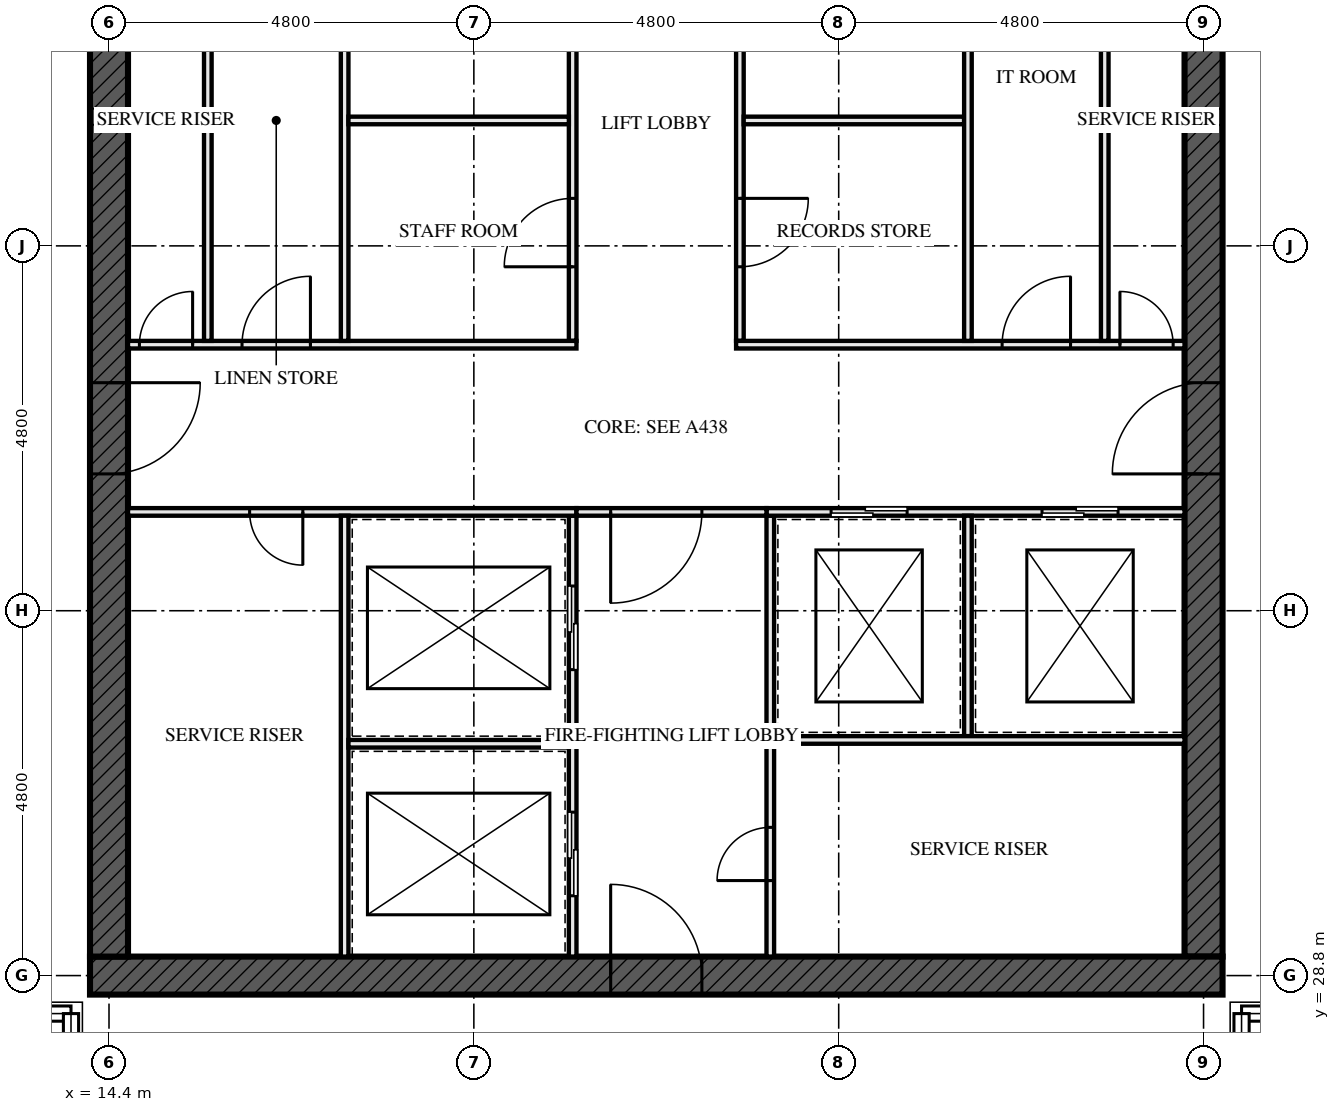
"""IFC4 building model, lengths in metres.
Left out: names, types, materials, properties, quantities, classifications, styles, units other than length and angle.
Written with IfcOpenShell. Run it as: python <this file> out.ifc"""

import sys

from ifc_helpers import new_model, si_unit, direction, frame, frame_2d, origin, place, context, subcontext, project, spatial, rectangle, extrude, element, fill, save


model = new_model("IFC4")
c1 = context("Model", 3, precision=1e-05, world=origin(), true_north=direction((0.0, 1.0)))
c2 = subcontext(c1, "Body", "Model", "MODEL_VIEW")
j1 = project(units=[si_unit("LENGTHUNIT", "METRE"), si_unit("PLANEANGLEUNIT", "RADIAN")], contexts=[c1])
p1 = place(None, origin())
s1 = spatial("IfcSite", under=j1, at=p1, CompositionType="ELEMENT")
p2 = place(p1, origin())
s2 = spatial("IfcBuilding", under=s1, at=p2, CompositionType="ELEMENT")
p3 = place(p2, frame((0.0, 0.0, 190.0)))
s3 = spatial("IfcBuildingStorey", under=s2, at=p3, CompositionType="ELEMENT", Elevation=190.0)
p4 = place(p3, frame((14.15, 28.8, -0.25), z_axis=(0.0, 0.0, 1.0), x_axis=(1.0, 0.0, 0.0)))
e1 = element("IfcWall", 1, at=p4, inside=s3, PredefinedType="SHEAR", context=c2, shape_type="SweptSolid", body=[
    extrude(rectangle(XDim=14.9, YDim=0.5, at=frame_2d((7.45, 0.0))), origin(), (0.0, 0.0, 1.0), 4.58),
])
p5 = place(p4, frame((6.85, 0.0, 0.25)))
e2 = element("IfcOpeningElement", 2, at=p5, cuts=e1, PredefinedType="OPENING", context=c2, shape_type="SweptSolid", body=[
    extrude(rectangle(XDim=1.2, YDim=2.1, at=frame_2d((0.6, 1.05))), frame((0.0, 0.26, 0.0), z_axis=(0.0, -1.0, 0.0), x_axis=(1.0, 0.0, 0.0)), (0.0, 0.0, 1.0), 0.521),
])
p6 = place(p3, frame((14.4, 42.95, -0.25), z_axis=(0.0, 0.0, 1.0), x_axis=(0.0, -1.0, 0.0)))
e3 = element("IfcWall", 3, at=p6, inside=s3, PredefinedType="SHEAR", context=c2, shape_type="SweptSolid", body=[
    extrude(rectangle(XDim=13.9, YDim=0.5, at=frame_2d((6.95, 0.0))), origin(), (0.0, 0.0, 1.0), 4.58),
])
p7 = place(p6, frame((6.35, 0.0, 0.25)))
e4 = element("IfcOpeningElement", 4, at=p7, cuts=e3, PredefinedType="OPENING", context=c2, shape_type="SweptSolid", body=[
    extrude(rectangle(XDim=1.2, YDim=2.1, at=frame_2d((0.6, 1.05))), frame((0.0, 0.26, 0.0), z_axis=(0.0, -1.0, 0.0), x_axis=(1.0, 0.0, 0.0)), (0.0, 0.0, 1.0), 0.521),
])
p8 = place(p3, frame((28.8, 29.05, -0.25), z_axis=(0.0, 0.0, 1.0), x_axis=(0.0, 1.0, 0.0)))
e5 = element("IfcWall", 5, at=p8, inside=s3, PredefinedType="SHEAR", context=c2, shape_type="SweptSolid", body=[
    extrude(rectangle(XDim=13.9, YDim=0.5, at=frame_2d((6.95, 0.0))), origin(), (0.0, 0.0, 1.0), 4.58),
])
p9 = place(p8, frame((6.35, 0.0, 0.25)))
e6 = element("IfcOpeningElement", 6, at=p9, cuts=e5, PredefinedType="OPENING", context=c2, shape_type="SweptSolid", body=[
    extrude(rectangle(XDim=1.2, YDim=2.1, at=frame_2d((0.6, 1.05))), frame((0.0, 0.26, 0.0), z_axis=(0.0, -1.0, 0.0), x_axis=(1.0, 0.0, 0.0)), (0.0, 0.0, 1.0), 0.521),
])
for number, where, z_axis, x_axis in (
    (7, (15.7, 37.15, 0.0), (0.0, 0.0, 1.0), (0.0, 1.0, 0.0)),
    (8, (27.5, 37.15, 0.0), (0.0, 0.0, 1.0), (0.0, 1.0, 0.0)),
):
    element("IfcWall", number, at=place(p3, frame(where, z_axis=z_axis, x_axis=x_axis)), inside=s3, PredefinedType="SOLIDWALL", context=c2, shape_type="SweptSolid", body=[
        extrude(rectangle(XDim=5.8, YDim=0.1, at=frame_2d((2.9, 0.0))), origin(), (0.0, 0.0, 1.0), 4.33),
    ])
p10 = place(p3, frame((20.5, 29.05, 0.0), z_axis=(0.0, 0.0, 1.0), x_axis=(0.0, 1.0, 0.0)))
e9 = element("IfcWall", 9, at=p10, inside=s3, PredefinedType="SOLIDWALL", context=c2, shape_type="SweptSolid", body=[
    extrude(rectangle(XDim=5.8, YDim=0.1, at=frame_2d((2.9, 0.0))), origin(), (0.0, 0.0, 1.0), 4.33),
])
p11 = place(p10, frame((0.8, 0.0, 0.0)))
e10 = element("IfcOpeningElement", 10, at=p11, cuts=e9, PredefinedType="OPENING", context=c2, shape_type="SweptSolid", body=[
    extrude(rectangle(XDim=1.1, YDim=2.3, at=frame_2d((0.55, 1.15))), frame((0.0, 0.061, 0.0), z_axis=(0.0, -1.0, 0.0), x_axis=(1.0, 0.0, 0.0)), (0.0, 0.0, 1.0), 0.121),
])
p12 = place(p10, frame((3.775, 0.0, 0.0)))
e11 = element("IfcOpeningElement", 11, at=p12, cuts=e9, PredefinedType="OPENING", context=c2, shape_type="SweptSolid", body=[
    extrude(rectangle(XDim=1.1, YDim=2.3, at=frame_2d((0.55, 1.15))), frame((0.0, 0.061, 0.0), z_axis=(0.0, -1.0, 0.0), x_axis=(1.0, 0.0, 0.0)), (0.0, 0.0, 1.0), 0.121),
])
p13 = place(p3, frame((20.5, 37.15, 0.0), z_axis=(0.0, 0.0, 1.0), x_axis=(0.0, 1.0, 0.0)))
e12 = element("IfcWall", 12, at=p13, inside=s3, PredefinedType="SOLIDWALL", context=c2, shape_type="SweptSolid", body=[
    extrude(rectangle(XDim=5.8, YDim=0.1, at=frame_2d((2.9, 0.0))), origin(), (0.0, 0.0, 1.0), 4.33),
])
p14 = place(p13, frame((0.975, 0.0, 0.0)))
e13 = element("IfcOpeningElement", 13, at=p14, cuts=e12, PredefinedType="OPENING", context=c2, shape_type="SweptSolid", body=[
    extrude(rectangle(XDim=0.9, YDim=2.1, at=frame_2d((0.45, 1.05))), frame((0.0, 0.061, 0.0), z_axis=(0.0, -1.0, 0.0), x_axis=(1.0, 0.0, 0.0)), (0.0, 0.0, 1.0), 0.121),
])
p15 = place(p13, frame((3.95, 0.0, 0.0)))
e14 = element("IfcOpeningElement", 14, at=p15, cuts=e12, PredefinedType="OPENING", context=c2, shape_type="SweptSolid", body=[
    extrude(rectangle(XDim=0.9, YDim=2.1, at=frame_2d((0.45, 1.05))), frame((0.0, 0.061, 0.0), z_axis=(0.0, -1.0, 0.0), x_axis=(1.0, 0.0, 0.0)), (0.0, 0.0, 1.0), 0.121),
])
p16 = place(p3, frame((22.7, 37.15, 0.0), z_axis=(0.0, 0.0, 1.0), x_axis=(0.0, 1.0, 0.0)))
e15 = element("IfcWall", 15, at=p16, inside=s3, PredefinedType="SOLIDWALL", context=c2, shape_type="SweptSolid", body=[
    extrude(rectangle(XDim=5.8, YDim=0.1, at=frame_2d((2.9, 0.0))), origin(), (0.0, 0.0, 1.0), 4.33),
])
p17 = place(p16, frame((0.975, 0.0, 0.0)))
e16 = element("IfcOpeningElement", 16, at=p17, cuts=e15, PredefinedType="OPENING", context=c2, shape_type="SweptSolid", body=[
    extrude(rectangle(XDim=0.9, YDim=2.1, at=frame_2d((0.45, 1.05))), frame((0.0, 0.061, 0.0), z_axis=(0.0, -1.0, 0.0), x_axis=(1.0, 0.0, 0.0)), (0.0, 0.0, 1.0), 0.121),
])
p18 = place(p16, frame((3.95, 0.0, 0.0)))
e17 = element("IfcOpeningElement", 17, at=p18, cuts=e15, PredefinedType="OPENING", context=c2, shape_type="SweptSolid", body=[
    extrude(rectangle(XDim=0.9, YDim=2.1, at=frame_2d((0.45, 1.05))), frame((0.0, 0.061, 0.0), z_axis=(0.0, -1.0, 0.0), x_axis=(1.0, 0.0, 0.0)), (0.0, 0.0, 1.0), 0.121),
])
p19 = place(p3, frame((23.1, 29.05, 0.0), z_axis=(0.0, 0.0, 1.0), x_axis=(0.0, 1.0, 0.0)))
e18 = element("IfcWall", 18, at=p19, inside=s3, PredefinedType="SOLIDWALL", context=c2, shape_type="SweptSolid", body=[
    extrude(rectangle(XDim=5.8, YDim=0.1, at=frame_2d((2.9, 0.0))), origin(), (0.0, 0.0, 1.0), 4.33),
])
p20 = place(p19, frame((1.0, 0.0, 0.0)))
e19 = element("IfcOpeningElement", 19, at=p20, cuts=e18, PredefinedType="OPENING", context=c2, shape_type="SweptSolid", body=[
    extrude(rectangle(XDim=0.7, YDim=2.1, at=frame_2d((0.35, 1.05))), frame((0.0, 0.061, 0.0), z_axis=(0.0, -1.0, 0.0), x_axis=(1.0, 0.0, 0.0)), (0.0, 0.0, 1.0), 0.121),
])
p21 = place(p3, frame((14.65, 34.9, 0.0), z_axis=(0.0, 0.0, 1.0), x_axis=(1.0, 0.0, 0.0)))
e20 = element("IfcWall", 20, at=p21, inside=s3, PredefinedType="SOLIDWALL", context=c2, shape_type="SweptSolid", body=[
    extrude(rectangle(XDim=5.9, YDim=0.1, at=frame_2d((2.95, 0.0))), origin(), (0.0, 0.0, 1.0), 4.33),
])
p22 = place(p21, frame((1.6, 0.0, 0.0)))
e21 = element("IfcOpeningElement", 21, at=p22, cuts=e20, PredefinedType="OPENING", context=c2, shape_type="SweptSolid", body=[
    extrude(rectangle(XDim=0.7, YDim=2.1, at=frame_2d((0.35, 1.05))), frame((0.0, 0.061, 0.0), z_axis=(0.0, -1.0, 0.0), x_axis=(1.0, 0.0, 0.0)), (0.0, 0.0, 1.0), 0.121),
])
p23 = place(p3, frame((23.05, 34.9, 0.0), z_axis=(0.0, 0.0, 1.0), x_axis=(1.0, 0.0, 0.0)))
e22 = element("IfcWall", 22, at=p23, inside=s3, PredefinedType="SOLIDWALL", context=c2, shape_type="SweptSolid", body=[
    extrude(rectangle(XDim=5.5, YDim=0.1, at=frame_2d((2.75, 0.0))), origin(), (0.0, 0.0, 1.0), 4.33),
])
p24 = place(p23, frame((0.85, 0.0, 0.0)))
e23 = element("IfcOpeningElement", 23, at=p24, cuts=e22, PredefinedType="OPENING", context=c2, shape_type="SweptSolid", body=[
    extrude(rectangle(XDim=1.0, YDim=2.1, at=frame_2d((0.5, 1.05))), frame((0.0, 0.061, 0.0), z_axis=(0.0, -1.0, 0.0), x_axis=(1.0, 0.0, 0.0)), (0.0, 0.0, 1.0), 0.121),
])
p25 = place(p23, frame((3.625, 0.0, 0.0)))
e24 = element("IfcOpeningElement", 24, at=p25, cuts=e22, PredefinedType="OPENING", context=c2, shape_type="SweptSolid", body=[
    extrude(rectangle(XDim=1.0, YDim=2.1, at=frame_2d((0.5, 1.05))), frame((0.0, 0.061, 0.0), z_axis=(0.0, -1.0, 0.0), x_axis=(1.0, 0.0, 0.0)), (0.0, 0.0, 1.0), 0.121),
])
p26 = place(p3, frame((14.65, 37.1, 0.0), z_axis=(0.0, 0.0, 1.0), x_axis=(1.0, 0.0, 0.0)))
e25 = element("IfcWall", 25, at=p26, inside=s3, PredefinedType="SOLIDWALL", context=c2, shape_type="SweptSolid", body=[
    extrude(rectangle(XDim=5.9, YDim=0.1, at=frame_2d((2.95, 0.0))), origin(), (0.0, 0.0, 1.0), 4.33),
])
p27 = place(p26, frame((0.15, 0.0, 0.0)))
e26 = element("IfcOpeningElement", 26, at=p27, cuts=e25, PredefinedType="OPENING", context=c2, shape_type="SweptSolid", body=[
    extrude(rectangle(XDim=0.7, YDim=2.1, at=frame_2d((0.35, 1.05))), frame((0.0, 0.061, 0.0), z_axis=(0.0, -1.0, 0.0), x_axis=(1.0, 0.0, 0.0)), (0.0, 0.0, 1.0), 0.121),
])
p28 = place(p26, frame((1.5, 0.0, 0.0)))
e27 = element("IfcOpeningElement", 27, at=p28, cuts=e25, PredefinedType="OPENING", context=c2, shape_type="SweptSolid", body=[
    extrude(rectangle(XDim=0.9, YDim=2.1, at=frame_2d((0.45, 1.05))), frame((0.0, 0.061, 0.0), z_axis=(0.0, -1.0, 0.0), x_axis=(1.0, 0.0, 0.0)), (0.0, 0.0, 1.0), 0.121),
])
p29 = place(p3, frame((22.65, 37.1, 0.0), z_axis=(0.0, 0.0, 1.0), x_axis=(1.0, 0.0, 0.0)))
e28 = element("IfcWall", 28, at=p29, inside=s3, PredefinedType="SOLIDWALL", context=c2, shape_type="SweptSolid", body=[
    extrude(rectangle(XDim=5.9, YDim=0.1, at=frame_2d((2.95, 0.0))), origin(), (0.0, 0.0, 1.0), 4.33),
])
p30 = place(p29, frame((3.5, 0.0, 0.0)))
e29 = element("IfcOpeningElement", 29, at=p30, cuts=e28, PredefinedType="OPENING", context=c2, shape_type="SweptSolid", body=[
    extrude(rectangle(XDim=0.9, YDim=2.1, at=frame_2d((0.45, 1.05))), frame((0.0, 0.061, 0.0), z_axis=(0.0, -1.0, 0.0), x_axis=(1.0, 0.0, 0.0)), (0.0, 0.0, 1.0), 0.121),
])
p31 = place(p29, frame((5.05, 0.0, 0.0)))
e30 = element("IfcOpeningElement", 30, at=p31, cuts=e28, PredefinedType="OPENING", context=c2, shape_type="SweptSolid", body=[
    extrude(rectangle(XDim=0.7, YDim=2.1, at=frame_2d((0.35, 1.05))), frame((0.0, 0.061, 0.0), z_axis=(0.0, -1.0, 0.0), x_axis=(1.0, 0.0, 0.0)), (0.0, 0.0, 1.0), 0.121),
])
p32 = place(p3, frame((20.55, 34.9, 0.0), z_axis=(0.0, 0.0, 1.0), x_axis=(1.0, 0.0, 0.0)))
e31 = element("IfcWall", 31, at=p32, inside=s3, PredefinedType="SOLIDWALL", context=c2, shape_type="SweptSolid", body=[
    extrude(rectangle(XDim=2.5, YDim=0.1, at=frame_2d((1.25, 0.0))), origin(), (0.0, 0.0, 1.0), 4.33),
])
p33 = place(p32, frame((0.45, 0.0, 0.0)))
e32 = element("IfcOpeningElement", 32, at=p33, cuts=e31, PredefinedType="OPENING", context=c2, shape_type="SweptSolid", body=[
    extrude(rectangle(XDim=1.2, YDim=2.1, at=frame_2d((0.6, 1.05))), frame((0.0, 0.061, 0.0), z_axis=(0.0, -1.0, 0.0), x_axis=(1.0, 0.0, 0.0)), (0.0, 0.0, 1.0), 0.121),
])
p34 = place(p3, frame((17.5, 29.05, 0.0), z_axis=(0.0, 0.0, 1.0), x_axis=(0.0, 1.0, 0.0)))
e33 = element("IfcWall", 33, at=p34, inside=s3, PredefinedType="SOLIDWALL", context=c2, shape_type="SweptSolid", body=[
    extrude(rectangle(XDim=5.8, YDim=0.1, at=frame_2d((2.9, 0.0))), origin(), (0.0, 0.0, 1.0), 4.33),
])
p35 = place(p3, frame((17.55, 31.85, 0.0), z_axis=(0.0, 0.0, 1.0), x_axis=(1.0, 0.0, 0.0)))
e34 = element("IfcWall", 34, at=p35, inside=s3, PredefinedType="SOLIDWALL", context=c2, shape_type="SweptSolid", body=[
    extrude(rectangle(XDim=2.9, YDim=0.1, at=frame_2d((1.45, 0.0))), origin(), (0.0, 0.0, 1.0), 4.33),
])
p36 = place(p3, frame((17.5, 37.15, 0.0), z_axis=(0.0, 0.0, 1.0), x_axis=(0.0, 1.0, 0.0)))
e35 = element("IfcWall", 35, at=p36, inside=s3, PredefinedType="SOLIDWALL", context=c2, shape_type="SweptSolid", body=[
    extrude(rectangle(XDim=5.8, YDim=0.1, at=frame_2d((2.9, 0.0))), origin(), (0.0, 0.0, 1.0), 4.33),
])
for number, where, z_axis, x_axis in (
    (36, (17.55, 40.05, 0.0), (0.0, 0.0, 1.0), (1.0, 0.0, 0.0)),
    (37, (22.75, 40.05, 0.0), (0.0, 0.0, 1.0), (1.0, 0.0, 0.0)),
):
    element("IfcWall", number, at=place(p3, frame(where, z_axis=z_axis, x_axis=x_axis)), inside=s3, PredefinedType="SOLIDWALL", context=c2, shape_type="SweptSolid", body=[
        extrude(rectangle(XDim=2.9, YDim=0.1, at=frame_2d((1.45, 0.0))), origin(), (0.0, 0.0, 1.0), 4.33),
    ])
p37 = place(p3, frame((25.7, 37.15, 0.0), z_axis=(0.0, 0.0, 1.0), x_axis=(0.0, 1.0, 0.0)))
e38 = element("IfcWall", 38, at=p37, inside=s3, PredefinedType="SOLIDWALL", context=c2, shape_type="SweptSolid", body=[
    extrude(rectangle(XDim=5.8, YDim=0.1, at=frame_2d((2.9, 0.0))), origin(), (0.0, 0.0, 1.0), 4.33),
])
p38 = place(p3, frame((25.7, 31.95, 0.0), z_axis=(0.0, 0.0, 1.0), x_axis=(0.0, 1.0, 0.0)))
e39 = element("IfcWall", 39, at=p38, inside=s3, PredefinedType="SOLIDWALL", context=c2, shape_type="SweptSolid", body=[
    extrude(rectangle(XDim=2.9, YDim=0.1, at=frame_2d((1.45, 0.0))), origin(), (0.0, 0.0, 1.0), 4.33),
])
p39 = place(p3, frame((23.15, 31.9, 0.0), z_axis=(0.0, 0.0, 1.0), x_axis=(1.0, 0.0, 0.0)))
e40 = element("IfcWall", 40, at=p39, inside=s3, PredefinedType="SOLIDWALL", context=c2, shape_type="SweptSolid", body=[
    extrude(rectangle(XDim=5.4, YDim=0.1, at=frame_2d((2.7, 0.0))), origin(), (0.0, 0.0, 1.0), 4.33),
])
p40 = place(p11, origin())
e41 = element("IfcDoor", 41, at=p40, inside=s3, OperationType="SLIDING_TO_LEFT", PredefinedType="DOOR", context=c2, shape_type="SweptSolid", body=[
    extrude(rectangle(XDim=1.1, YDim=2.3, at=frame_2d((0.55, 1.15))), frame((0.0, 0.05, 0.0), z_axis=(0.0, -1.0, 0.0), x_axis=(1.0, 0.0, 0.0)), (0.0, 0.0, 1.0), 0.1),
])
fill(e10, e41)
p41 = place(p12, origin())
e42 = element("IfcDoor", 42, at=p41, inside=s3, OperationType="SLIDING_TO_LEFT", PredefinedType="DOOR", context=c2, shape_type="SweptSolid", body=[
    extrude(rectangle(XDim=1.1, YDim=2.3, at=frame_2d((0.55, 1.15))), frame((0.0, 0.05, 0.0), z_axis=(0.0, -1.0, 0.0), x_axis=(1.0, 0.0, 0.0)), (0.0, 0.0, 1.0), 0.1),
])
fill(e11, e42)
p42 = place(p14, origin())
e43 = element("IfcDoor", 43, at=p42, inside=s3, OperationType="SINGLE_SWING_RIGHT", PredefinedType="DOOR", context=c2, shape_type="SweptSolid", body=[
    extrude(rectangle(XDim=0.9, YDim=2.1, at=frame_2d((0.45, 1.05))), frame((0.0, 0.027, 0.0), z_axis=(0.0, -1.0, 0.0), x_axis=(1.0, 0.0, 0.0)), (0.0, 0.0, 1.0), 0.054),
])
fill(e13, e43)
p43 = place(p17, frame((0.9, 0.0, 0.0), z_axis=(0.0, 0.0, 1.0), x_axis=(-1.0, 0.0, 0.0)))
e44 = element("IfcDoor", 44, at=p43, inside=s3, OperationType="SINGLE_SWING_RIGHT", PredefinedType="DOOR", context=c2, shape_type="SweptSolid", body=[
    extrude(rectangle(XDim=0.9, YDim=2.1, at=frame_2d((0.45, 1.05))), frame((0.0, 0.027, 0.0), z_axis=(0.0, -1.0, 0.0), x_axis=(1.0, 0.0, 0.0)), (0.0, 0.0, 1.0), 0.054),
])
fill(e16, e44)
p44 = place(p20, origin())
e45 = element("IfcDoor", 45, at=p44, inside=s3, OperationType="SINGLE_SWING_RIGHT", PredefinedType="DOOR", context=c2, shape_type="SweptSolid", body=[
    extrude(rectangle(XDim=0.7, YDim=2.1, at=frame_2d((0.35, 1.05))), frame((0.0, 0.027, 0.0), z_axis=(0.0, -1.0, 0.0), x_axis=(1.0, 0.0, 0.0)), (0.0, 0.0, 1.0), 0.054),
])
fill(e19, e45)
p45 = place(p22, frame((0.7, 0.0, 0.0), z_axis=(0.0, 0.0, 1.0), x_axis=(-1.0, 0.0, 0.0)))
e46 = element("IfcDoor", 46, at=p45, inside=s3, OperationType="SINGLE_SWING_RIGHT", PredefinedType="DOOR", context=c2, shape_type="SweptSolid", body=[
    extrude(rectangle(XDim=0.7, YDim=2.1, at=frame_2d((0.35, 1.05))), frame((0.0, 0.027, 0.0), z_axis=(0.0, -1.0, 0.0), x_axis=(1.0, 0.0, 0.0)), (0.0, 0.0, 1.0), 0.054),
])
fill(e21, e46)
p46 = place(p24, origin())
e47 = element("IfcDoor", 47, at=p46, inside=s3, OperationType="SLIDING_TO_LEFT", PredefinedType="DOOR", context=c2, shape_type="SweptSolid", body=[
    extrude(rectangle(XDim=1.0, YDim=2.1, at=frame_2d((0.5, 1.05))), frame((0.0, 0.05, 0.0), z_axis=(0.0, -1.0, 0.0), x_axis=(1.0, 0.0, 0.0)), (0.0, 0.0, 1.0), 0.1),
])
fill(e23, e47)
p47 = place(p25, origin())
e48 = element("IfcDoor", 48, at=p47, inside=s3, OperationType="SLIDING_TO_LEFT", PredefinedType="DOOR", context=c2, shape_type="SweptSolid", body=[
    extrude(rectangle(XDim=1.0, YDim=2.1, at=frame_2d((0.5, 1.05))), frame((0.0, 0.05, 0.0), z_axis=(0.0, -1.0, 0.0), x_axis=(1.0, 0.0, 0.0)), (0.0, 0.0, 1.0), 0.1),
])
fill(e24, e48)
p48 = place(p27, origin())
e49 = element("IfcDoor", 49, at=p48, inside=s3, OperationType="SINGLE_SWING_LEFT", PredefinedType="DOOR", context=c2, shape_type="SweptSolid", body=[
    extrude(rectangle(XDim=0.7, YDim=2.1, at=frame_2d((0.35, 1.05))), frame((0.0, 0.027, 0.0), z_axis=(0.0, -1.0, 0.0), x_axis=(1.0, 0.0, 0.0)), (0.0, 0.0, 1.0), 0.054),
])
fill(e26, e49)
p49 = place(p28, origin())
e50 = element("IfcDoor", 50, at=p49, inside=s3, OperationType="SINGLE_SWING_LEFT", PredefinedType="DOOR", context=c2, shape_type="SweptSolid", body=[
    extrude(rectangle(XDim=0.9, YDim=2.1, at=frame_2d((0.45, 1.05))), frame((0.0, 0.027, 0.0), z_axis=(0.0, -1.0, 0.0), x_axis=(1.0, 0.0, 0.0)), (0.0, 0.0, 1.0), 0.054),
])
fill(e27, e50)
p50 = place(p30, origin())
e51 = element("IfcDoor", 51, at=p50, inside=s3, OperationType="SINGLE_SWING_LEFT", PredefinedType="DOOR", context=c2, shape_type="SweptSolid", body=[
    extrude(rectangle(XDim=0.9, YDim=2.1, at=frame_2d((0.45, 1.05))), frame((0.0, 0.027, 0.0), z_axis=(0.0, -1.0, 0.0), x_axis=(1.0, 0.0, 0.0)), (0.0, 0.0, 1.0), 0.054),
])
fill(e29, e51)
p51 = place(p31, origin())
e52 = element("IfcDoor", 52, at=p51, inside=s3, OperationType="SINGLE_SWING_RIGHT", PredefinedType="DOOR", context=c2, shape_type="SweptSolid", body=[
    extrude(rectangle(XDim=0.7, YDim=2.1, at=frame_2d((0.35, 1.05))), frame((0.0, 0.027, 0.0), z_axis=(0.0, -1.0, 0.0), x_axis=(1.0, 0.0, 0.0)), (0.0, 0.0, 1.0), 0.054),
])
fill(e30, e52)
p52 = place(p33, frame((1.2, 0.0, 0.0), z_axis=(0.0, 0.0, 1.0), x_axis=(-1.0, 0.0, 0.0)))
e53 = element("IfcDoor", 53, at=p52, inside=s3, OperationType="SINGLE_SWING_LEFT", PredefinedType="DOOR", context=c2, shape_type="SweptSolid", body=[
    extrude(rectangle(XDim=1.2, YDim=2.1, at=frame_2d((0.6, 1.05))), frame((0.0, 0.027, 0.0), z_axis=(0.0, -1.0, 0.0), x_axis=(1.0, 0.0, 0.0)), (0.0, 0.0, 1.0), 0.054),
])
fill(e32, e53)
p53 = place(p5, origin())
e54 = element("IfcDoor", 54, at=p53, inside=s3, OperationType="SINGLE_SWING_LEFT", PredefinedType="DOOR", context=c2, shape_type="SweptSolid", body=[
    extrude(rectangle(XDim=1.2, YDim=2.1, at=frame_2d((0.6, 1.05))), frame((0.0, 0.027, 0.0), z_axis=(0.0, -1.0, 0.0), x_axis=(1.0, 0.0, 0.0)), (0.0, 0.0, 1.0), 0.054),
])
fill(e2, e54)
p54 = place(p7, origin())
e55 = element("IfcDoor", 55, at=p54, inside=s3, OperationType="SINGLE_SWING_LEFT", PredefinedType="DOOR", context=c2, shape_type="SweptSolid", body=[
    extrude(rectangle(XDim=1.2, YDim=2.1, at=frame_2d((0.6, 1.05))), frame((0.0, 0.027, 0.0), z_axis=(0.0, -1.0, 0.0), x_axis=(1.0, 0.0, 0.0)), (0.0, 0.0, 1.0), 0.054),
])
fill(e4, e55)
p55 = place(p9, origin())
e56 = element("IfcDoor", 56, at=p55, inside=s3, OperationType="SINGLE_SWING_LEFT", PredefinedType="DOOR", context=c2, shape_type="SweptSolid", body=[
    extrude(rectangle(XDim=1.2, YDim=2.1, at=frame_2d((0.6, 1.05))), frame((0.0, 0.027, 0.0), z_axis=(0.0, -1.0, 0.0), x_axis=(1.0, 0.0, 0.0)), (0.0, 0.0, 1.0), 0.054),
])
fill(e6, e56)
save(model, sys.argv[1])
